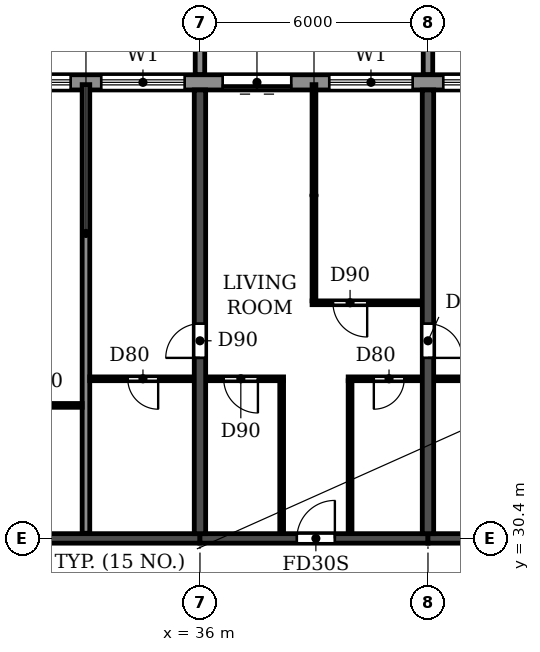
"""IFC4 building model, lengths in metres.
Left out: names, types, materials, properties, quantities, classifications, styles, units other than length and angle.
Written with IfcOpenShell. Run it as: python <this file> out.ifc"""

import sys

from ifc_helpers import new_model, si_unit, direction, frame, frame_2d, origin, place, context, subcontext, project, spatial, polyline, rectangle, outline, extrude, source, transform, mapped, element, fill, save


model = new_model("IFC4")
c1 = context("Model", 3, precision=1e-05, world=origin(), true_north=direction((0.0, 1.0)))
c2 = subcontext(c1, "Body", "Model", "MODEL_VIEW")
j1 = project(units=[si_unit("LENGTHUNIT", "METRE"), si_unit("PLANEANGLEUNIT", "RADIAN")], contexts=[c1])
p1 = place(None, origin())
s1 = spatial("IfcSite", under=j1, at=p1, CompositionType="ELEMENT")
p2 = place(p1, origin())
s2 = spatial("IfcBuilding", under=s1, at=p2, CompositionType="ELEMENT")
p3 = place(p2, frame((0.0, 0.0, 142.2)))
s3 = spatial("IfcBuildingStorey", under=s2, at=p3, CompositionType="ELEMENT", Elevation=142.2)
p4 = place(p3, frame((36.0, 30.525, 0.0), z_axis=(0.0, 0.0, 1.0), x_axis=(0.0, 1.0, 0.0)))
e1 = element("IfcWall", 1, at=p4, inside=s3, PredefinedType="SHEAR", context=c2, shape_type="SweptSolid", body=[
    extrude(rectangle(XDim=11.675, YDim=0.3, at=frame_2d((5.837, 0.0))), origin(), (0.0, 0.0, 1.0), 3.07),
])
p5 = place(p4, frame((4.625, 0.0, 0.0)))
e2 = element("IfcOpeningElement", 2, at=p5, cuts=e1, PredefinedType="OPENING", context=c2, shape_type="SweptSolid", body=[
    extrude(rectangle(XDim=0.9, YDim=2.1, at=frame_2d((0.45, 1.05))), frame((0.0, 0.16, 0.0), z_axis=(0.0, -1.0, 0.0), x_axis=(1.0, 0.0, 0.0)), (0.0, 0.0, 1.0), 0.32),
])
p6 = place(p3, frame((42.0, 30.525, 0.0), z_axis=(0.0, 0.0, 1.0), x_axis=(0.0, 1.0, 0.0)))
e3 = element("IfcWall", 3, at=p6, inside=s3, PredefinedType="SHEAR", context=c2, shape_type="SweptSolid", body=[
    extrude(rectangle(XDim=11.675, YDim=0.3, at=frame_2d((5.837, 0.0))), origin(), (0.0, 0.0, 1.0), 3.07),
])
p7 = place(p6, frame((4.625, 0.0, 0.0)))
e4 = element("IfcOpeningElement", 4, at=p7, cuts=e3, PredefinedType="OPENING", context=c2, shape_type="SweptSolid", body=[
    extrude(rectangle(XDim=0.9, YDim=2.1, at=frame_2d((0.45, 1.05))), frame((0.0, 0.16, 0.0), z_axis=(0.0, -1.0, 0.0), x_axis=(1.0, 0.0, 0.0)), (0.0, 0.0, 1.0), 0.32),
])
p8 = place(p3, frame((30.0, 30.4, 0.0), z_axis=(0.0, 0.0, 1.0), x_axis=(1.0, 0.0, 0.0)))
e5 = element("IfcWall", 5, at=p8, inside=s3, PredefinedType="SHEAR", context=c2, shape_type="SweptSolid", body=[
    extrude(rectangle(XDim=6.0, YDim=0.25, at=frame_2d((3.0, 0.0))), origin(), (0.0, 0.0, 1.0), 2.47),
])
p9 = place(p3, frame((36.0, 30.4, 0.0), z_axis=(0.0, 0.0, 1.0), x_axis=(1.0, 0.0, 0.0)))
e6 = element("IfcWall", 6, at=p9, inside=s3, PredefinedType="SHEAR", context=c2, shape_type="SweptSolid", body=[
    extrude(rectangle(XDim=6.0, YDim=0.25, at=frame_2d((3.0, 0.0))), origin(), (0.0, 0.0, 1.0), 2.47),
])
p10 = place(p9, frame((2.55, 0.0, 0.0)))
e7 = element("IfcOpeningElement", 7, at=p10, cuts=e6, PredefinedType="OPENING", context=c2, shape_type="SweptSolid", body=[
    extrude(rectangle(XDim=1.0, YDim=2.1, at=frame_2d((0.5, 1.05))), frame((0.0, 0.135, 0.0), z_axis=(0.0, -1.0, 0.0), x_axis=(1.0, 0.0, 0.0)), (0.0, 0.0, 1.0), 0.27),
])
p11 = place(p3, frame((42.0, 30.4, 0.0), z_axis=(0.0, 0.0, 1.0), x_axis=(1.0, 0.0, 0.0)))
e8 = element("IfcWall", 8, at=p11, inside=s3, PredefinedType="SHEAR", context=c2, shape_type="SweptSolid", body=[
    extrude(rectangle(XDim=6.0, YDim=0.25, at=frame_2d((3.0, 0.0))), origin(), (0.0, 0.0, 1.0), 2.47),
])
p12 = place(p3, frame((85.317, 42.4, 0.0), z_axis=(0.0, 0.0, 1.0), x_axis=(-1.0, 0.0, 0.0)))
e9 = element("IfcWall", 9, at=p12, inside=s3, PredefinedType="STANDARD", context=c2, shape_type="SweptSolid", body=[
    extrude(rectangle(XDim=68.634, YDim=0.4, at=frame_2d((34.317, 0.0))), origin(), (0.0, 0.0, 1.0), 3.07),
])
p13 = place(p12, frame((64.717, 0.0, 0.9)))
e10 = element("IfcOpeningElement", 10, at=p13, cuts=e9, PredefinedType="OPENING", context=c2, shape_type="SweptSolid", body=[
    extrude(rectangle(XDim=2.2, YDim=1.5, at=frame_2d((1.1, 0.75))), frame((0.0, 0.21, 0.0), z_axis=(0.0, -1.0, 0.0), x_axis=(1.0, 0.0, 0.0)), (0.0, 0.0, 1.0), 0.42),
])
p14 = place(p12, frame((61.917, 0.0, 0.0)))
e11 = element("IfcOpeningElement", 11, at=p14, cuts=e9, PredefinedType="OPENING", context=c2, shape_type="SweptSolid", body=[
    extrude(rectangle(XDim=1.8, YDim=2.4, at=frame_2d((0.9, 1.2))), frame((0.0, 0.21, 0.0), z_axis=(0.0, -1.0, 0.0), x_axis=(1.0, 0.0, 0.0)), (0.0, 0.0, 1.0), 0.42),
])
p15 = place(p12, frame((58.717, 0.0, 0.9)))
e12 = element("IfcOpeningElement", 12, at=p15, cuts=e9, PredefinedType="OPENING", context=c2, shape_type="SweptSolid", body=[
    extrude(rectangle(XDim=2.2, YDim=1.5, at=frame_2d((1.1, 0.75))), frame((0.0, 0.21, 0.0), z_axis=(0.0, -1.0, 0.0), x_axis=(1.0, 0.0, 0.0)), (0.0, 0.0, 1.0), 0.42),
])
p16 = place(p12, frame((55.917, 0.0, 0.0)))
e13 = element("IfcOpeningElement", 13, at=p16, cuts=e9, PredefinedType="OPENING", context=c2, shape_type="SweptSolid", body=[
    extrude(rectangle(XDim=1.8, YDim=2.4, at=frame_2d((0.9, 1.2))), frame((0.0, 0.21, 0.0), z_axis=(0.0, -1.0, 0.0), x_axis=(1.0, 0.0, 0.0)), (0.0, 0.0, 1.0), 0.42),
])
p17 = place(p12, frame((52.717, 0.0, 0.9)))
e14 = element("IfcOpeningElement", 14, at=p17, cuts=e9, PredefinedType="OPENING", context=c2, shape_type="SweptSolid", body=[
    extrude(rectangle(XDim=2.2, YDim=1.5, at=frame_2d((1.1, 0.75))), frame((0.0, 0.21, 0.0), z_axis=(0.0, -1.0, 0.0), x_axis=(1.0, 0.0, 0.0)), (0.0, 0.0, 1.0), 0.42),
])
p18 = place(p12, frame((49.717, 0.0, 0.9)))
e15 = element("IfcOpeningElement", 15, at=p18, cuts=e9, PredefinedType="OPENING", context=c2, shape_type="SweptSolid", body=[
    extrude(rectangle(XDim=2.2, YDim=1.5, at=frame_2d((1.1, 0.75))), frame((0.0, 0.21, 0.0), z_axis=(0.0, -1.0, 0.0), x_axis=(1.0, 0.0, 0.0)), (0.0, 0.0, 1.0), 0.42),
])
p19 = place(p12, frame((46.917, 0.0, 0.0)))
e16 = element("IfcOpeningElement", 16, at=p19, cuts=e9, PredefinedType="OPENING", context=c2, shape_type="SweptSolid", body=[
    extrude(rectangle(XDim=1.8, YDim=2.4, at=frame_2d((0.9, 1.2))), frame((0.0, 0.21, 0.0), z_axis=(0.0, -1.0, 0.0), x_axis=(1.0, 0.0, 0.0)), (0.0, 0.0, 1.0), 0.42),
])
p20 = place(p12, frame((43.717, 0.0, 0.9)))
e17 = element("IfcOpeningElement", 17, at=p20, cuts=e9, PredefinedType="OPENING", context=c2, shape_type="SweptSolid", body=[
    extrude(rectangle(XDim=2.2, YDim=1.5, at=frame_2d((1.1, 0.75))), frame((0.0, 0.21, 0.0), z_axis=(0.0, -1.0, 0.0), x_axis=(1.0, 0.0, 0.0)), (0.0, 0.0, 1.0), 0.42),
])
p21 = place(p12, frame((40.717, 0.0, 0.9)))
e18 = element("IfcOpeningElement", 18, at=p21, cuts=e9, PredefinedType="OPENING", context=c2, shape_type="SweptSolid", body=[
    extrude(rectangle(XDim=2.2, YDim=1.5, at=frame_2d((1.1, 0.75))), frame((0.0, 0.21, 0.0), z_axis=(0.0, -1.0, 0.0), x_axis=(1.0, 0.0, 0.0)), (0.0, 0.0, 1.0), 0.42),
])
p22 = place(p12, frame((37.717, 0.0, 0.9)))
e19 = element("IfcOpeningElement", 19, at=p22, cuts=e9, PredefinedType="OPENING", context=c2, shape_type="SweptSolid", body=[
    extrude(rectangle(XDim=2.2, YDim=1.5, at=frame_2d((1.1, 0.75))), frame((0.0, 0.21, 0.0), z_axis=(0.0, -1.0, 0.0), x_axis=(1.0, 0.0, 0.0)), (0.0, 0.0, 1.0), 0.42),
])
p23 = place(p12, frame((34.717, 0.0, 0.9)))
e20 = element("IfcOpeningElement", 20, at=p23, cuts=e9, PredefinedType="OPENING", context=c2, shape_type="SweptSolid", body=[
    extrude(rectangle(XDim=2.2, YDim=1.5, at=frame_2d((1.1, 0.75))), frame((0.0, 0.21, 0.0), z_axis=(0.0, -1.0, 0.0), x_axis=(1.0, 0.0, 0.0)), (0.0, 0.0, 1.0), 0.42),
])
p24 = place(p12, frame((31.917, 0.0, 0.0)))
e21 = element("IfcOpeningElement", 21, at=p24, cuts=e9, PredefinedType="OPENING", context=c2, shape_type="SweptSolid", body=[
    extrude(rectangle(XDim=1.8, YDim=2.4, at=frame_2d((0.9, 1.2))), frame((0.0, 0.21, 0.0), z_axis=(0.0, -1.0, 0.0), x_axis=(1.0, 0.0, 0.0)), (0.0, 0.0, 1.0), 0.42),
])
p25 = place(p12, frame((28.917, 0.0, 0.0)))
e22 = element("IfcOpeningElement", 22, at=p25, cuts=e9, PredefinedType="OPENING", context=c2, shape_type="SweptSolid", body=[
    extrude(rectangle(XDim=1.8, YDim=2.4, at=frame_2d((0.9, 1.2))), frame((0.0, 0.21, 0.0), z_axis=(0.0, -1.0, 0.0), x_axis=(1.0, 0.0, 0.0)), (0.0, 0.0, 1.0), 0.42),
])
p26 = place(p12, frame((25.717, 0.0, 0.9)))
e23 = element("IfcOpeningElement", 23, at=p26, cuts=e9, PredefinedType="OPENING", context=c2, shape_type="SweptSolid", body=[
    extrude(rectangle(XDim=2.2, YDim=1.5, at=frame_2d((1.1, 0.75))), frame((0.0, 0.21, 0.0), z_axis=(0.0, -1.0, 0.0), x_axis=(1.0, 0.0, 0.0)), (0.0, 0.0, 1.0), 0.42),
])
p27 = place(p12, frame((22.717, 0.0, 0.9)))
e24 = element("IfcOpeningElement", 24, at=p27, cuts=e9, PredefinedType="OPENING", context=c2, shape_type="SweptSolid", body=[
    extrude(rectangle(XDim=2.2, YDim=1.5, at=frame_2d((1.1, 0.75))), frame((0.0, 0.21, 0.0), z_axis=(0.0, -1.0, 0.0), x_axis=(1.0, 0.0, 0.0)), (0.0, 0.0, 1.0), 0.42),
])
p28 = place(p12, frame((19.717, 0.0, 0.9)))
e25 = element("IfcOpeningElement", 25, at=p28, cuts=e9, PredefinedType="OPENING", context=c2, shape_type="SweptSolid", body=[
    extrude(rectangle(XDim=2.2, YDim=1.5, at=frame_2d((1.1, 0.75))), frame((0.0, 0.21, 0.0), z_axis=(0.0, -1.0, 0.0), x_axis=(1.0, 0.0, 0.0)), (0.0, 0.0, 1.0), 0.42),
])
p29 = place(p12, frame((16.717, 0.0, 0.9)))
e26 = element("IfcOpeningElement", 26, at=p29, cuts=e9, PredefinedType="OPENING", context=c2, shape_type="SweptSolid", body=[
    extrude(rectangle(XDim=2.2, YDim=1.5, at=frame_2d((1.1, 0.75))), frame((0.0, 0.21, 0.0), z_axis=(0.0, -1.0, 0.0), x_axis=(1.0, 0.0, 0.0)), (0.0, 0.0, 1.0), 0.42),
])
p30 = place(p12, frame((13.917, 0.0, 0.0)))
e27 = element("IfcOpeningElement", 27, at=p30, cuts=e9, PredefinedType="OPENING", context=c2, shape_type="SweptSolid", body=[
    extrude(rectangle(XDim=1.8, YDim=2.4, at=frame_2d((0.9, 1.2))), frame((0.0, 0.21, 0.0), z_axis=(0.0, -1.0, 0.0), x_axis=(1.0, 0.0, 0.0)), (0.0, 0.0, 1.0), 0.42),
])
p31 = place(p12, frame((10.917, 0.0, 0.0)))
e28 = element("IfcOpeningElement", 28, at=p31, cuts=e9, PredefinedType="OPENING", context=c2, shape_type="SweptSolid", body=[
    extrude(rectangle(XDim=1.8, YDim=2.4, at=frame_2d((0.9, 1.2))), frame((0.0, 0.21, 0.0), z_axis=(0.0, -1.0, 0.0), x_axis=(1.0, 0.0, 0.0)), (0.0, 0.0, 1.0), 0.42),
])
p32 = place(p12, frame((7.717, 0.0, 0.9)))
e29 = element("IfcOpeningElement", 29, at=p32, cuts=e9, PredefinedType="OPENING", context=c2, shape_type="SweptSolid", body=[
    extrude(rectangle(XDim=2.2, YDim=1.5, at=frame_2d((1.1, 0.75))), frame((0.0, 0.21, 0.0), z_axis=(0.0, -1.0, 0.0), x_axis=(1.0, 0.0, 0.0)), (0.0, 0.0, 1.0), 0.42),
])
p33 = place(p12, frame((4.717, 0.0, 0.9)))
e30 = element("IfcOpeningElement", 30, at=p33, cuts=e9, PredefinedType="OPENING", context=c2, shape_type="SweptSolid", body=[
    extrude(rectangle(XDim=2.2, YDim=1.5, at=frame_2d((1.1, 0.75))), frame((0.0, 0.21, 0.0), z_axis=(0.0, -1.0, 0.0), x_axis=(1.0, 0.0, 0.0)), (0.0, 0.0, 1.0), 0.42),
])
p34 = place(p12, frame((1.917, 0.0, 0.0)))
e31 = element("IfcOpeningElement", 31, at=p34, cuts=e9, PredefinedType="OPENING", context=c2, shape_type="SweptSolid", body=[
    extrude(rectangle(XDim=1.8, YDim=2.4, at=frame_2d((0.9, 1.2))), frame((0.0, 0.21, 0.0), z_axis=(0.0, -1.0, 0.0), x_axis=(1.0, 0.0, 0.0)), (0.0, 0.0, 1.0), 0.42),
])
m1 = source(origin(), c2, "Body", "SweptSolid", [
    extrude(outline(polyline([(0.0, 0.0), (0.25, 0.0), (0.25, 3.1), (0.0, 3.1), (0.0, 0.0)])), origin(), (0.0, 0.0, 1.0), 3.1),
])
for number, where in (
    (32, (35.875, 42.6, 0.0)),
    (33, (41.875, 42.6, 0.0)),
):
    element("IfcWall", number, at=place(p3, frame(where)), inside=s3, PredefinedType="STANDARD", context=c2, shape_type="MappedRepresentation", body=[
        mapped(m1, transform((0.0, 0.0, 0.0))),
    ])
p35 = place(p3, frame((33.0, 30.535, 0.0), z_axis=(0.0, 0.0, 1.0), x_axis=(0.0, 1.0, 0.0)))
e34 = element("IfcWall", 34, at=p35, inside=s3, PredefinedType="PARTITIONING", context=c2, shape_type="SweptSolid", body=[
    extrude(rectangle(XDim=11.805, YDim=0.2, at=frame_2d((5.903, 0.0))), origin(), (0.0, 0.0, 1.0), 3.07),
])
p36 = place(p3, frame((30.16, 33.9, 0.0), z_axis=(0.0, 0.0, 1.0), x_axis=(1.0, 0.0, 0.0)))
e35 = element("IfcWall", 35, at=p36, inside=s3, PredefinedType="PARTITIONING", context=c2, shape_type="SweptSolid", body=[
    extrude(rectangle(XDim=2.74, YDim=0.1, at=frame_2d((1.37, 0.0))), origin(), (0.0, 0.0, 1.0), 3.07),
])
p37 = place(p36, frame((0.94, 0.0, 0.0)))
e36 = element("IfcOpeningElement", 36, at=p37, cuts=e35, PredefinedType="OPENING", context=c2, shape_type="SweptSolid", body=[
    extrude(rectangle(XDim=0.8, YDim=2.1, at=frame_2d((0.4, 1.05))), frame((0.0, 0.06, 0.0), z_axis=(0.0, -1.0, 0.0), x_axis=(1.0, 0.0, 0.0)), (0.0, 0.0, 1.0), 0.12),
])
p38 = place(p3, frame((33.1, 34.6, 0.0), z_axis=(0.0, 0.0, 1.0), x_axis=(1.0, 0.0, 0.0)))
e37 = element("IfcWall", 37, at=p38, inside=s3, PredefinedType="PARTITIONING", context=c2, shape_type="SweptSolid", body=[
    extrude(rectangle(XDim=2.74, YDim=0.1, at=frame_2d((1.37, 0.0))), origin(), (0.0, 0.0, 1.0), 3.07),
])
p39 = place(p38, frame((1.0, 0.0, 0.0)))
e38 = element("IfcOpeningElement", 38, at=p39, cuts=e37, PredefinedType="OPENING", context=c2, shape_type="SweptSolid", body=[
    extrude(rectangle(XDim=0.8, YDim=2.1, at=frame_2d((0.4, 1.05))), frame((0.0, 0.06, 0.0), z_axis=(0.0, -1.0, 0.0), x_axis=(1.0, 0.0, 0.0)), (0.0, 0.0, 1.0), 0.12),
])
p40 = place(p3, frame((36.16, 34.6, 0.0), z_axis=(0.0, 0.0, 1.0), x_axis=(1.0, 0.0, 0.0)))
e39 = element("IfcWall", 39, at=p40, inside=s3, PredefinedType="PARTITIONING", context=c2, shape_type="SweptSolid", body=[
    extrude(rectangle(XDim=2.04, YDim=0.1, at=frame_2d((1.02, 0.0))), origin(), (0.0, 0.0, 1.0), 3.07),
])
p41 = place(p40, frame((0.465, 0.0, 0.0)))
e40 = element("IfcOpeningElement", 40, at=p41, cuts=e39, PredefinedType="OPENING", context=c2, shape_type="SweptSolid", body=[
    extrude(rectangle(XDim=0.9, YDim=2.1, at=frame_2d((0.45, 1.05))), frame((0.0, 0.06, 0.0), z_axis=(0.0, -1.0, 0.0), x_axis=(1.0, 0.0, 0.0)), (0.0, 0.0, 1.0), 0.12),
])
p42 = place(p3, frame((39.9, 34.6, 0.0), z_axis=(0.0, 0.0, 1.0), x_axis=(1.0, 0.0, 0.0)))
e41 = element("IfcWall", 41, at=p42, inside=s3, PredefinedType="PARTITIONING", context=c2, shape_type="SweptSolid", body=[
    extrude(rectangle(XDim=1.94, YDim=0.1, at=frame_2d((0.97, 0.0))), origin(), (0.0, 0.0, 1.0), 3.07),
])
p43 = place(p42, frame((0.675, 0.0, 0.0)))
e42 = element("IfcOpeningElement", 42, at=p43, cuts=e41, PredefinedType="OPENING", context=c2, shape_type="SweptSolid", body=[
    extrude(rectangle(XDim=0.8, YDim=2.1, at=frame_2d((0.4, 1.05))), frame((0.0, 0.06, 0.0), z_axis=(0.0, -1.0, 0.0), x_axis=(1.0, 0.0, 0.0)), (0.0, 0.0, 1.0), 0.12),
])
p44 = place(p3, frame((42.16, 34.6, 0.0), z_axis=(0.0, 0.0, 1.0), x_axis=(1.0, 0.0, 0.0)))
e43 = element("IfcWall", 43, at=p44, inside=s3, PredefinedType="PARTITIONING", context=c2, shape_type="SweptSolid", body=[
    extrude(rectangle(XDim=2.94, YDim=0.1, at=frame_2d((1.47, 0.0))), origin(), (0.0, 0.0, 1.0), 3.07),
])
p45 = place(p44, frame((0.94, 0.0, 0.0)))
e44 = element("IfcOpeningElement", 44, at=p45, cuts=e43, PredefinedType="OPENING", context=c2, shape_type="SweptSolid", body=[
    extrude(rectangle(XDim=0.8, YDim=2.1, at=frame_2d((0.4, 1.05))), frame((0.0, 0.06, 0.0), z_axis=(0.0, -1.0, 0.0), x_axis=(1.0, 0.0, 0.0)), (0.0, 0.0, 1.0), 0.12),
])
p46 = place(p3, frame((38.95, 36.6, 0.0), z_axis=(0.0, 0.0, 1.0), x_axis=(1.0, 0.0, 0.0)))
e45 = element("IfcWall", 45, at=p46, inside=s3, PredefinedType="PARTITIONING", context=c2, shape_type="SweptSolid", body=[
    extrude(rectangle(XDim=2.89, YDim=0.1, at=frame_2d((1.445, 0.0))), origin(), (0.0, 0.0, 1.0), 3.07),
])
p47 = place(p46, frame((0.55, 0.0, 0.0)))
e46 = element("IfcOpeningElement", 46, at=p47, cuts=e45, PredefinedType="OPENING", context=c2, shape_type="SweptSolid", body=[
    extrude(rectangle(XDim=0.9, YDim=2.1, at=frame_2d((0.45, 1.05))), frame((0.0, 0.06, 0.0), z_axis=(0.0, -1.0, 0.0), x_axis=(1.0, 0.0, 0.0)), (0.0, 0.0, 1.0), 0.12),
])
p48 = place(p3, frame((38.15, 30.535, 0.0), z_axis=(0.0, 0.0, 1.0), x_axis=(0.0, 1.0, 0.0)))
e47 = element("IfcWall", 47, at=p48, inside=s3, PredefinedType="PARTITIONING", context=c2, shape_type="SweptSolid", body=[
    extrude(rectangle(XDim=4.015, YDim=0.1, at=frame_2d((2.008, 0.0))), origin(), (0.0, 0.0, 1.0), 3.07),
])
p49 = place(p3, frame((39.0, 36.65, 0.0), z_axis=(0.0, 0.0, 1.0), x_axis=(0.0, 1.0, 0.0)))
e48 = element("IfcWall", 48, at=p49, inside=s3, PredefinedType="PARTITIONING", context=c2, shape_type="SweptSolid", body=[
    extrude(rectangle(XDim=5.69, YDim=0.1, at=frame_2d((2.845, 0.0))), origin(), (0.0, 0.0, 1.0), 3.07),
])
p50 = place(p3, frame((39.95, 30.535, 0.0), z_axis=(0.0, 0.0, 1.0), x_axis=(0.0, 1.0, 0.0)))
e49 = element("IfcWall", 49, at=p50, inside=s3, PredefinedType="PARTITIONING", context=c2, shape_type="SweptSolid", body=[
    extrude(rectangle(XDim=4.015, YDim=0.1, at=frame_2d((2.008, 0.0))), origin(), (0.0, 0.0, 1.0), 3.07),
])
p51 = place(p17, origin())
e50 = element("IfcWindow", 50, at=p51, inside=s3, PartitioningType="DOUBLE_PANEL_HORIZONTAL", PredefinedType="WINDOW", context=c2, shape_type="SweptSolid", body=[
    extrude(rectangle(XDim=2.2, YDim=1.5, at=frame_2d((1.1, 0.75))), frame((0.0, 0.03, 0.0), z_axis=(0.0, -1.0, 0.0), x_axis=(1.0, 0.0, 0.0)), (0.0, 0.0, 1.0), 0.06),
])
fill(e14, e50)
p52 = place(p18, origin())
e51 = element("IfcWindow", 51, at=p52, inside=s3, PartitioningType="DOUBLE_PANEL_HORIZONTAL", PredefinedType="WINDOW", context=c2, shape_type="SweptSolid", body=[
    extrude(rectangle(XDim=2.2, YDim=1.5, at=frame_2d((1.1, 0.75))), frame((0.0, 0.03, 0.0), z_axis=(0.0, -1.0, 0.0), x_axis=(1.0, 0.0, 0.0)), (0.0, 0.0, 1.0), 0.06),
])
fill(e15, e51)
p53 = place(p19, origin())
e52 = element("IfcDoor", 52, at=p53, inside=s3, OperationType="DOUBLE_DOOR_SLIDING", PredefinedType="DOOR", context=c2, shape_type="SweptSolid", body=[
    extrude(rectangle(XDim=1.8, YDim=2.4, at=frame_2d((0.9, 1.2))), frame((0.0, 0.025, 0.0), z_axis=(0.0, -1.0, 0.0), x_axis=(1.0, 0.0, 0.0)), (0.0, 0.0, 1.0), 0.05),
])
fill(e16, e52)
p54 = place(p20, origin())
e53 = element("IfcWindow", 53, at=p54, inside=s3, PartitioningType="DOUBLE_PANEL_HORIZONTAL", PredefinedType="WINDOW", context=c2, shape_type="SweptSolid", body=[
    extrude(rectangle(XDim=2.2, YDim=1.5, at=frame_2d((1.1, 0.75))), frame((0.0, 0.03, 0.0), z_axis=(0.0, -1.0, 0.0), x_axis=(1.0, 0.0, 0.0)), (0.0, 0.0, 1.0), 0.06),
])
fill(e17, e53)
p55 = place(p21, origin())
e54 = element("IfcWindow", 54, at=p55, inside=s3, PartitioningType="DOUBLE_PANEL_HORIZONTAL", PredefinedType="WINDOW", context=c2, shape_type="SweptSolid", body=[
    extrude(rectangle(XDim=2.2, YDim=1.5, at=frame_2d((1.1, 0.75))), frame((0.0, 0.03, 0.0), z_axis=(0.0, -1.0, 0.0), x_axis=(1.0, 0.0, 0.0)), (0.0, 0.0, 1.0), 0.06),
])
fill(e18, e54)
p56 = place(p39, frame((0.8, 0.0, 0.0), z_axis=(0.0, 0.0, 1.0), x_axis=(-1.0, 0.0, 0.0)))
e55 = element("IfcDoor", 55, at=p56, inside=s3, OperationType="SINGLE_SWING_LEFT", PredefinedType="DOOR", context=c2, shape_type="SweptSolid", body=[
    extrude(rectangle(XDim=0.8, YDim=2.1, at=frame_2d((0.4, 1.05))), frame((0.0, 0.025, 0.0), z_axis=(0.0, -1.0, 0.0), x_axis=(1.0, 0.0, 0.0)), (0.0, 0.0, 1.0), 0.05),
])
fill(e38, e55)
p57 = place(p5, origin())
e56 = element("IfcDoor", 56, at=p57, inside=s3, OperationType="SINGLE_SWING_LEFT", PredefinedType="DOOR", context=c2, shape_type="SweptSolid", body=[
    extrude(rectangle(XDim=0.9, YDim=2.1, at=frame_2d((0.45, 1.05))), frame((0.0, 0.025, 0.0), z_axis=(0.0, -1.0, 0.0), x_axis=(1.0, 0.0, 0.0)), (0.0, 0.0, 1.0), 0.05),
])
fill(e2, e56)
p58 = place(p41, frame((0.9, 0.0, 0.0), z_axis=(0.0, 0.0, 1.0), x_axis=(-1.0, 0.0, 0.0)))
e57 = element("IfcDoor", 57, at=p58, inside=s3, OperationType="SINGLE_SWING_LEFT", PredefinedType="DOOR", context=c2, shape_type="SweptSolid", body=[
    extrude(rectangle(XDim=0.9, YDim=2.1, at=frame_2d((0.45, 1.05))), frame((0.0, 0.025, 0.0), z_axis=(0.0, -1.0, 0.0), x_axis=(1.0, 0.0, 0.0)), (0.0, 0.0, 1.0), 0.05),
])
fill(e40, e57)
p59 = place(p10, origin())
e58 = element("IfcDoor", 58, at=p59, inside=s3, OperationType="SINGLE_SWING_RIGHT", PredefinedType="DOOR", context=c2, shape_type="SweptSolid", body=[
    extrude(rectangle(XDim=1.0, YDim=2.1, at=frame_2d((0.5, 1.05))), frame((0.0, 0.025, 0.0), z_axis=(0.0, -1.0, 0.0), x_axis=(1.0, 0.0, 0.0)), (0.0, 0.0, 1.0), 0.05),
])
fill(e7, e58)
p60 = place(p47, frame((0.9, 0.0, 0.0), z_axis=(0.0, 0.0, 1.0), x_axis=(-1.0, 0.0, 0.0)))
e59 = element("IfcDoor", 59, at=p60, inside=s3, OperationType="SINGLE_SWING_LEFT", PredefinedType="DOOR", context=c2, shape_type="SweptSolid", body=[
    extrude(rectangle(XDim=0.9, YDim=2.1, at=frame_2d((0.45, 1.05))), frame((0.0, 0.025, 0.0), z_axis=(0.0, -1.0, 0.0), x_axis=(1.0, 0.0, 0.0)), (0.0, 0.0, 1.0), 0.05),
])
fill(e46, e59)
p61 = place(p43, frame((0.8, 0.0, 0.0), z_axis=(0.0, 0.0, 1.0), x_axis=(-1.0, 0.0, 0.0)))
e60 = element("IfcDoor", 60, at=p61, inside=s3, OperationType="SINGLE_SWING_RIGHT", PredefinedType="DOOR", context=c2, shape_type="SweptSolid", body=[
    extrude(rectangle(XDim=0.8, YDim=2.1, at=frame_2d((0.4, 1.05))), frame((0.0, 0.025, 0.0), z_axis=(0.0, -1.0, 0.0), x_axis=(1.0, 0.0, 0.0)), (0.0, 0.0, 1.0), 0.05),
])
fill(e42, e60)
p62 = place(p7, frame((0.9, 0.0, 0.0), z_axis=(0.0, 0.0, 1.0), x_axis=(-1.0, 0.0, 0.0)))
e61 = element("IfcDoor", 61, at=p62, inside=s3, OperationType="SINGLE_SWING_RIGHT", PredefinedType="DOOR", context=c2, shape_type="SweptSolid", body=[
    extrude(rectangle(XDim=0.9, YDim=2.1, at=frame_2d((0.45, 1.05))), frame((0.0, 0.025, 0.0), z_axis=(0.0, -1.0, 0.0), x_axis=(1.0, 0.0, 0.0)), (0.0, 0.0, 1.0), 0.05),
])
fill(e4, e61)
save(model, sys.argv[1])
